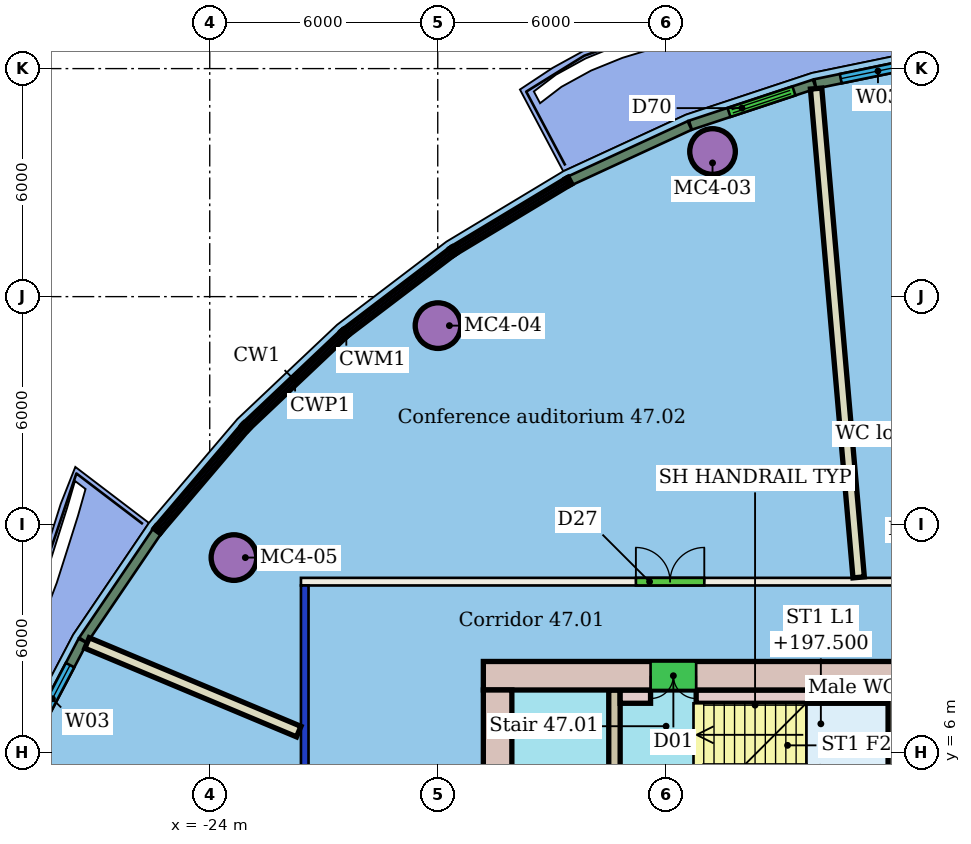
"""IFC4 building model, lengths in metres.
Left out: names, types, materials, properties, quantities, classifications, styles, units other than length and angle.
Written with IfcOpenShell. Run it as: python <this file> out.ifc"""

import sys

from ifc_helpers import new_model, si_unit, direction, frame, frame_2d, origin, origin_2d, place, context, subcontext, project, spatial, rectangle, hollow_circle, extrude, element, fill, save


model = new_model("IFC4")
c1 = context("Model", 3, precision=1e-05, world=origin(), true_north=direction((0.0, 1.0)))
c2 = subcontext(c1, "Body", "Model", "MODEL_VIEW")
j1 = project(units=[si_unit("LENGTHUNIT", "METRE"), si_unit("PLANEANGLEUNIT", "RADIAN")], contexts=[c1])
p1 = place(None, origin())
s1 = spatial("IfcSite", under=j1, at=p1, CompositionType="ELEMENT")
p2 = place(p1, origin())
s2 = spatial("IfcBuilding", under=s1, at=p2, CompositionType="ELEMENT")
p3 = place(p2, frame((0.0, 0.0, 195.7)))
s3 = spatial("IfcBuildingStorey", under=s2, at=p3, CompositionType="ELEMENT", Elevation=195.7)
for number, where, z_axis, x_axis in (
    (1, (-10.769, 21.819, 0.0), (0.0, 0.0, 1.0), (1.0, 0.0, 0.0)),
    (2, (-17.993, 17.237, 0.0), (0.0, 0.0, 1.0), (1.0, 0.0, 0.0)),
    (3, (-23.363, 11.134, 0.0), (0.0, 0.0, 1.0), (1.0, 0.0, 0.0)),
):
    element("IfcColumn", number, at=place(p3, frame(where, z_axis=z_axis, x_axis=x_axis)), inside=s3, PredefinedType="COLUMN", context=c2, shape_type="SweptSolid", body=[
        extrude(hollow_circle(Radius=0.6, WallThickness=0.045, at=origin_2d()), origin(), (0.0, 0.0, 1.0), 3.45),
    ])
p4 = place(p3, frame((-21.5, -10.4, 0.0), z_axis=(0.0, 0.0, 1.0), x_axis=(0.0, 1.0, 0.0)))
e4 = element("IfcWall", 4, at=p4, inside=s3, PredefinedType="PARTITIONING", context=c2, shape_type="SweptSolid", body=[
    extrude(rectangle(XDim=20.8, YDim=0.2, at=frame_2d((10.4, 0.0))), origin(), (0.0, 0.0, 1.0), 3.05),
])
p5 = place(p4, frame((11.02, 0.0, 0.0)))
e5 = element("IfcOpeningElement", 5, at=p5, cuts=e4, PredefinedType="OPENING", context=c2, shape_type="SweptSolid", body=[
    extrude(rectangle(XDim=1.8, YDim=2.4, at=frame_2d((0.9, 1.2))), frame((0.0, 0.11, 0.0), z_axis=(0.0, -1.0, 0.0), x_axis=(1.0, 0.0, 0.0)), (0.0, 0.0, 1.0), 0.22),
])
p6 = place(p3, frame((-21.6, 10.5, 0.0), z_axis=(0.0, 0.0, 1.0), x_axis=(1.0, 0.0, 0.0)))
e6 = element("IfcWall", 6, at=p6, inside=s3, PredefinedType="PARTITIONING", context=c2, shape_type="SweptSolid", body=[
    extrude(rectangle(XDim=31.2, YDim=0.2, at=frame_2d((15.6, 0.0))), origin(), (0.0, 0.0, 1.0), 3.45),
])
p7 = place(p6, frame((17.458, 0.0, 0.0)))
e7 = element("IfcOpeningElement", 7, at=p7, cuts=e6, PredefinedType="OPENING", context=c2, shape_type="SweptSolid", body=[
    extrude(rectangle(XDim=1.5, YDim=2.1, at=frame_2d((0.75, 1.05))), frame((0.0, 0.11, 0.0), z_axis=(0.0, -1.0, 0.0), x_axis=(1.0, 0.0, 0.0)), (0.0, 0.0, 1.0), 0.22),
])
p8 = place(p6, frame((8.814, 0.0, 0.0)))
e8 = element("IfcOpeningElement", 8, at=p8, cuts=e6, PredefinedType="OPENING", context=c2, shape_type="SweptSolid", body=[
    extrude(rectangle(XDim=1.8, YDim=2.4, at=frame_2d((0.9, 1.2))), frame((0.0, 0.11, 0.0), z_axis=(0.0, -1.0, 0.0), x_axis=(1.0, 0.0, 0.0)), (0.0, 0.0, 1.0), 0.22),
])
p9 = place(p6, frame((23.325, 0.0, 0.0)))
e9 = element("IfcOpeningElement", 9, at=p9, cuts=e6, PredefinedType="OPENING", context=c2, shape_type="SweptSolid", body=[
    extrude(rectangle(XDim=1.8, YDim=2.1, at=frame_2d((0.9, 1.05))), frame((0.0, 0.11, 0.0), z_axis=(0.0, -1.0, 0.0), x_axis=(1.0, 0.0, 0.0)), (0.0, 0.0, 1.0), 0.22),
])
p10 = place(p3, frame((-8.044, 23.474, 0.0), z_axis=(0.0, 0.0, 1.0), x_axis=(0.086744678296, -0.996230576115, 0.0)))
e10 = element("IfcWall", 10, at=p10, inside=s3, PredefinedType="PARTITIONING", context=c2, shape_type="SweptSolid", body=[
    extrude(rectangle(XDim=12.91, YDim=0.3, at=frame_2d((6.455, 0.0))), origin(), (0.0, 0.0, 1.0), 3.45),
])
p11 = place(p3, frame((-27.229, 8.887, 0.0), z_axis=(0.0, 0.0, 1.0), x_axis=(0.922430941615, -0.386162087667, 0.0)))
e11 = element("IfcWall", 11, at=p11, inside=s3, PredefinedType="PARTITIONING", context=c2, shape_type="SweptSolid", body=[
    extrude(rectangle(XDim=6.039, YDim=0.3, at=frame_2d((3.02, 0.0))), origin(), (0.0, 0.0, 1.0), 3.45),
])
p12 = place(p3, frame((-4.767, 24.276, 0.0), z_axis=(0.0, 0.0, 1.0), x_axis=(-0.979500828614, -0.201440131914, 0.0)))
e12 = element("IfcWall", 12, at=p12, inside=s3, PredefinedType="SOLIDWALL", context=c2, shape_type="SweptSolid", body=[
    extrude(rectangle(XDim=3.367, YDim=0.25, at=frame_2d((1.684, 0.0))), origin(), (0.0, 0.0, 1.0), 3.1),
])
p13 = place(p12, frame((0.683, 0.0, 0.9)))
e13 = element("IfcOpeningElement", 13, at=p13, cuts=e12, PredefinedType="OPENING", context=c2, shape_type="SweptSolid", body=[
    extrude(rectangle(XDim=2.0, YDim=2.1, at=frame_2d((1.0, 1.05))), frame((0.0, 0.135, 0.0), z_axis=(0.0, -1.0, 0.0), x_axis=(1.0, 0.0, 0.0)), (0.0, 0.0, 1.0), 0.27),
])
p14 = place(p3, frame((-8.087, 23.592, 0.0), z_axis=(0.0, 0.0, 1.0), x_axis=(-0.949348540896, -0.314224995663, 0.0)))
e14 = element("IfcWall", 14, at=p14, inside=s3, PredefinedType="SOLIDWALL", context=c2, shape_type="SweptSolid", body=[
    extrude(rectangle(XDim=3.439, YDim=0.25, at=frame_2d((1.719, 0.0))), origin(), (0.0, 0.0, 1.0), 3.1),
])
p15 = place(p14, frame((0.569, 0.0, 0.0)))
e15 = element("IfcOpeningElement", 15, at=p15, cuts=e14, PredefinedType="OPENING", context=c2, shape_type="SweptSolid", body=[
    extrude(rectangle(XDim=1.8, YDim=2.4, at=frame_2d((0.9, 1.2))), frame((0.0, 0.135, 0.0), z_axis=(0.0, -1.0, 0.0), x_axis=(1.0, 0.0, 0.0)), (0.0, 0.0, 1.0), 0.27),
])
p16 = place(p3, frame((-11.372, 22.503, 0.0), z_axis=(0.0, 0.0, 1.0), x_axis=(-0.907951105118, -0.419076115658, 0.0)))
e16 = element("IfcWall", 16, at=p16, inside=s3, PredefinedType="SOLIDWALL", context=c2, shape_type="SweptSolid", body=[
    extrude(rectangle(XDim=3.452, YDim=0.25, at=frame_2d((1.726, 0.0))), origin(), (0.0, 0.0, 1.0), 3.1),
])
p17 = place(p3, frame((-25.392, 11.818, 0.0), z_axis=(0.0, 0.0, 1.0), x_axis=(-0.561162409818, -0.827705714495, 0.0)))
e17 = element("IfcWall", 17, at=p17, inside=s3, PredefinedType="SOLIDWALL", context=c2, shape_type="SweptSolid", body=[
    extrude(rectangle(XDim=3.452, YDim=0.25, at=frame_2d((1.726, 0.0))), origin(), (0.0, 0.0, 1.0), 3.1),
])
p18 = place(p3, frame((-27.341, 8.941, 0.0), z_axis=(0.0, 0.0, 1.0), x_axis=(-0.464508293803, -0.885568769203, 0.0)))
e18 = element("IfcWall", 18, at=p18, inside=s3, PredefinedType="SOLIDWALL", context=c2, shape_type="SweptSolid", body=[
    extrude(rectangle(XDim=3.439, YDim=0.25, at=frame_2d((1.719, 0.0))), origin(), (0.0, 0.0, 1.0), 3.1),
])
p19 = place(p18, frame((0.719, 0.0, 0.9)))
e19 = element("IfcOpeningElement", 19, at=p19, cuts=e18, PredefinedType="OPENING", context=c2, shape_type="SweptSolid", body=[
    extrude(rectangle(XDim=2.0, YDim=2.1, at=frame_2d((1.0, 1.05))), frame((0.0, 0.135, 0.0), z_axis=(0.0, -1.0, 0.0), x_axis=(1.0, 0.0, 0.0)), (0.0, 0.0, 1.0), 0.27),
])
p20 = place(p3, frame((-6.0, 8.025, 0.0), z_axis=(0.0, 0.0, 1.0), x_axis=(-1.0, 0.0, 0.0)))
e20 = element("IfcWall", 20, at=p20, inside=s3, PredefinedType="SHEAR", context=c2, shape_type="SweptSolid", body=[
    extrude(rectangle(XDim=10.8, YDim=0.75, at=frame_2d((5.4, 0.0))), origin(), (0.0, 0.0, 1.0), 3.3),
])
p21 = place(p20, frame((5.2, 0.0, 0.0)))
e21 = element("IfcOpeningElement", 21, at=p21, cuts=e20, PredefinedType="OPENING", context=c2, shape_type="SweptSolid", body=[
    extrude(rectangle(XDim=1.2, YDim=2.1, at=frame_2d((0.6, 1.05))), frame((0.0, 0.385, 0.0), z_axis=(0.0, -1.0, 0.0), x_axis=(1.0, 0.0, 0.0)), (0.0, 0.0, 1.0), 0.77),
])
p22 = place(p3, frame((-16.425, 7.65, 0.0), z_axis=(0.0, 0.0, 1.0), x_axis=(0.0, -1.0, 0.0)))
e22 = element("IfcWall", 22, at=p22, inside=s3, PredefinedType="SHEAR", context=c2, shape_type="SweptSolid", body=[
    extrude(rectangle(XDim=15.3, YDim=0.75, at=frame_2d((7.65, 0.0))), origin(), (0.0, 0.0, 1.0), 3.3),
])
p23 = place(p22, frame((11.25, 0.0, 0.0)))
e23 = element("IfcOpeningElement", 23, at=p23, cuts=e22, PredefinedType="OPENING", context=c2, shape_type="SweptSolid", body=[
    extrude(rectangle(XDim=1.2, YDim=2.1, at=frame_2d((0.6, 1.05))), frame((0.0, 0.385, 0.0), z_axis=(0.0, -1.0, 0.0), x_axis=(1.0, 0.0, 0.0)), (0.0, 0.0, 1.0), 0.77),
])
p24 = place(p22, frame((2.85, 0.0, 0.0)))
e24 = element("IfcOpeningElement", 24, at=p24, cuts=e22, PredefinedType="OPENING", context=c2, shape_type="SweptSolid", body=[
    extrude(rectangle(XDim=1.2, YDim=2.1, at=frame_2d((0.6, 1.05))), frame((0.0, 0.385, 0.0), z_axis=(0.0, -1.0, 0.0), x_axis=(1.0, 0.0, 0.0)), (0.0, 0.0, 1.0), 0.77),
])
p25 = place(p3, frame((-13.35, 7.65, 0.0), z_axis=(0.0, 0.0, 1.0), x_axis=(0.0, -1.0, 0.0)))
e25 = element("IfcWall", 25, at=p25, inside=s3, PredefinedType="SHEAR", context=c2, shape_type="SweptSolid", body=[
    extrude(rectangle(XDim=15.3, YDim=0.3, at=frame_2d((7.65, 0.0))), origin(), (0.0, 0.0, 1.0), 3.3),
])
p26 = place(p25, frame((6.9, 0.0, 0.0)))
e26 = element("IfcOpeningElement", 26, at=p26, cuts=e25, PredefinedType="OPENING", context=c2, shape_type="SweptSolid", body=[
    extrude(rectangle(XDim=1.5, YDim=2.1, at=frame_2d((0.75, 1.05))), frame((0.0, 0.16, 0.0), z_axis=(0.0, -1.0, 0.0), x_axis=(1.0, 0.0, 0.0)), (0.0, 0.0, 1.0), 0.32),
])
p27 = place(p3, frame((-6.0, 3.88, 0.0), z_axis=(0.0, 0.0, 1.0), x_axis=(0.0, 1.0, 0.0)))
e27 = element("IfcWall", 27, at=p27, inside=s3, PredefinedType="SHEAR", context=c2, shape_type="SweptSolid", body=[
    extrude(rectangle(XDim=3.77, YDim=0.3, at=frame_2d((1.885, 0.0))), origin(), (0.0, 0.0, 1.0), 3.3),
])
p28 = place(p3, frame((-13.2, 7.475, 0.0), z_axis=(0.0, 0.0, 1.0), x_axis=(1.0, 0.0, 0.0)))
e28 = element("IfcWall", 28, at=p28, inside=s3, PredefinedType="SHEAR", context=c2, shape_type="SweptSolid", body=[
    extrude(rectangle(XDim=0.8, YDim=0.35, at=frame_2d((0.4, 0.0))), origin(), (0.0, 0.0, 1.0), 3.3),
])
p29 = place(p3, frame((-11.2, 7.475, 0.0), z_axis=(0.0, 0.0, 1.0), x_axis=(1.0, 0.0, 0.0)))
e29 = element("IfcWall", 29, at=p29, inside=s3, PredefinedType="SHEAR", context=c2, shape_type="SweptSolid", body=[
    extrude(rectangle(XDim=5.05, YDim=0.35, at=frame_2d((2.525, 0.0))), origin(), (0.0, 0.0, 1.0), 3.3),
])
p30 = place(p8, origin())
e30 = element("IfcDoor", 30, at=p30, inside=s3, OperationType="DOUBLE_DOOR_SINGLE_SWING", PredefinedType="DOOR", context=c2, shape_type="SweptSolid", body=[
    extrude(rectangle(XDim=1.8, YDim=2.4, at=frame_2d((0.9, 1.2))), frame((0.0, 0.025, 0.0), z_axis=(0.0, -1.0, 0.0), x_axis=(1.0, 0.0, 0.0)), (0.0, 0.0, 1.0), 0.05),
])
fill(e8, e30)
p31 = place(p13, origin())
e31 = element("IfcWindow", 31, at=p31, inside=s3, PartitioningType="SINGLE_PANEL", PredefinedType="WINDOW", context=c2, shape_type="SweptSolid", body=[
    extrude(rectangle(XDim=2.0, YDim=2.1, at=frame_2d((1.0, 1.05))), frame((0.0, 0.03, 0.0), z_axis=(0.0, -1.0, 0.0), x_axis=(1.0, 0.0, 0.0)), (0.0, 0.0, 1.0), 0.06),
])
fill(e13, e31)
p32 = place(p15, origin())
e32 = element("IfcDoor", 32, at=p32, inside=s3, OperationType="DOUBLE_DOOR_SLIDING", PredefinedType="DOOR", context=c2, shape_type="SweptSolid", body=[
    extrude(rectangle(XDim=1.8, YDim=2.4, at=frame_2d((0.9, 1.2))), frame((0.0, 0.025, 0.0), z_axis=(0.0, -1.0, 0.0), x_axis=(1.0, 0.0, 0.0)), (0.0, 0.0, 1.0), 0.05),
])
fill(e15, e32)
p33 = place(p19, origin())
e33 = element("IfcWindow", 33, at=p33, inside=s3, PartitioningType="SINGLE_PANEL", PredefinedType="WINDOW", context=c2, shape_type="SweptSolid", body=[
    extrude(rectangle(XDim=2.0, YDim=2.1, at=frame_2d((1.0, 1.05))), frame((0.0, 0.03, 0.0), z_axis=(0.0, -1.0, 0.0), x_axis=(1.0, 0.0, 0.0)), (0.0, 0.0, 1.0), 0.06),
])
fill(e19, e33)
p34 = place(p21, origin())
e34 = element("IfcDoor", 34, at=p34, inside=s3, OperationType="DOUBLE_DOOR_SINGLE_SWING", PredefinedType="NOTDEFINED", context=c2, shape_type="SweptSolid", body=[
    extrude(rectangle(XDim=1.2, YDim=2.1, at=frame_2d((0.6, 1.05))), frame((0.0, 0.025, 0.0), z_axis=(0.0, -1.0, 0.0), x_axis=(1.0, 0.0, 0.0)), (0.0, 0.0, 1.0), 0.05),
])
fill(e21, e34)
save(model, sys.argv[1])
